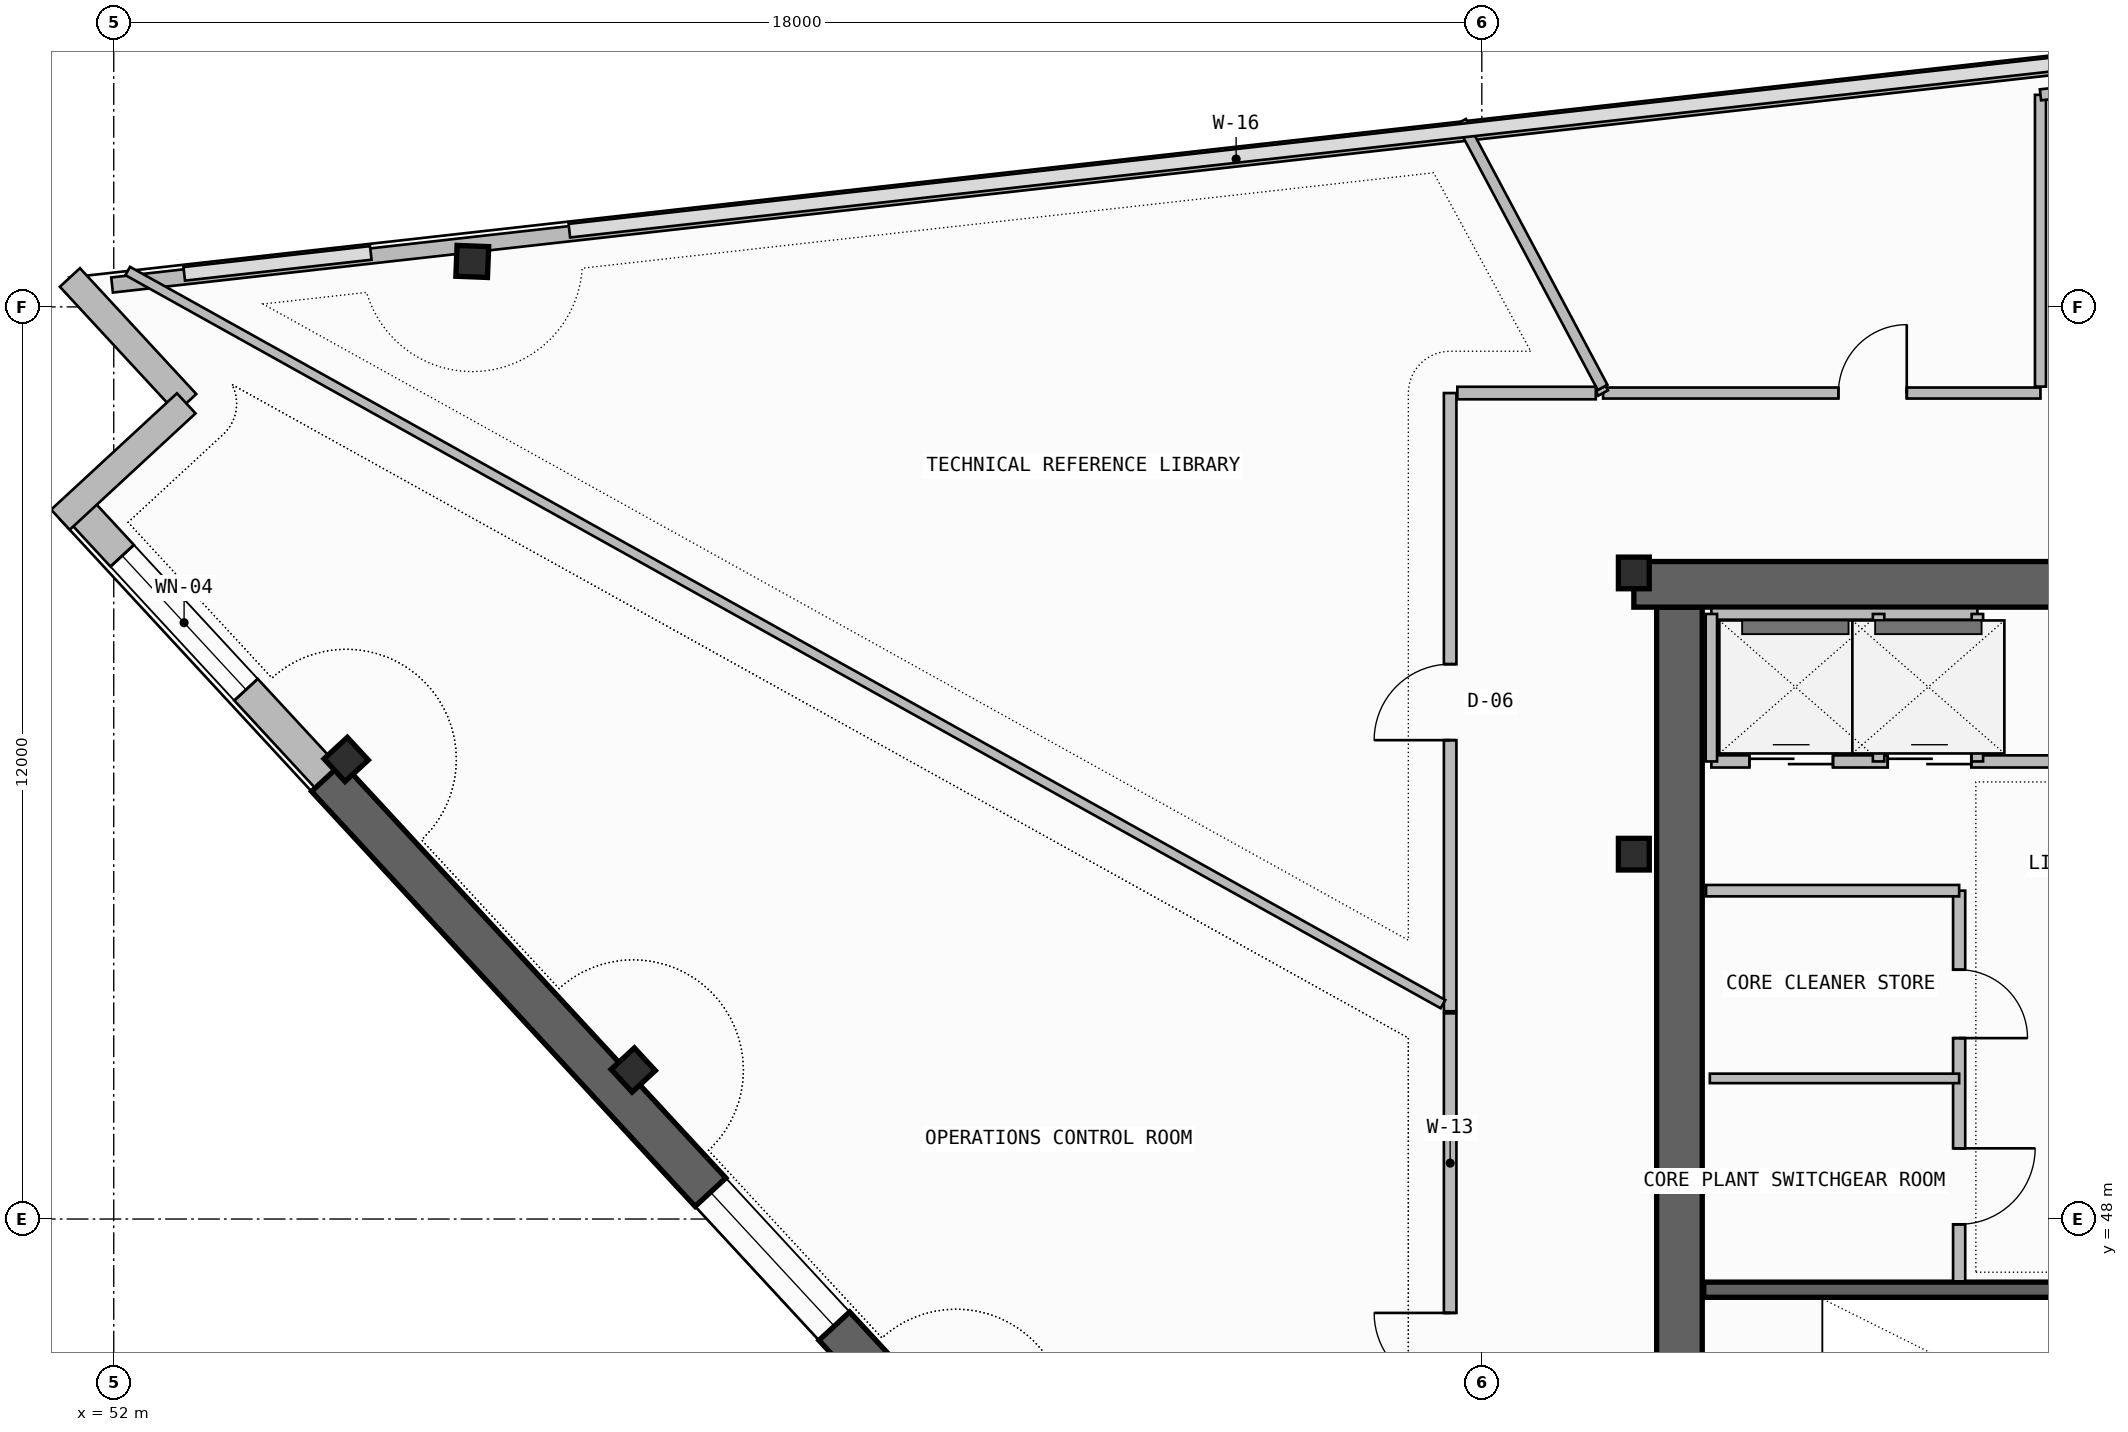
"""IFC4 building model, lengths in metres.
Left out: names, types, materials, properties, quantities, classifications, styles, units other than length and angle.
Written with IfcOpenShell. Run it as: python <this file> out.ifc"""

import sys

from ifc_helpers import new_model, si_unit, direction, frame, frame_2d, origin, origin_2d, place, context, subcontext, project, spatial, rectangle, i_section, extrude, element, fill, save


model = new_model("IFC4")
c1 = context("Model", 3, precision=1e-05, world=origin(), true_north=direction((0.0, 1.0)))
c2 = subcontext(c1, "Body", "Model", "MODEL_VIEW")
j1 = project(units=[si_unit("LENGTHUNIT", "METRE"), si_unit("PLANEANGLEUNIT", "RADIAN")], contexts=[c1])
p1 = place(None, origin())
s1 = spatial("IfcSite", under=j1, at=p1, CompositionType="ELEMENT")
p2 = place(p1, origin())
s2 = spatial("IfcBuilding", under=s1, at=p2, CompositionType="ELEMENT")
p3 = place(p2, frame((0.0, 0.0, 292.42)))
s3 = spatial("IfcBuildingStorey", under=s2, at=p3, CompositionType="ELEMENT", Elevation=292.42)
p4 = place(p3, frame((72.6, 43.35, -0.26), z_axis=(0.0, 0.0, 1.0), x_axis=(0.0, 1.0, 0.0)))
e1 = element("IfcWall", 1, at=p4, inside=s3, PredefinedType="SHEAR", context=c2, shape_type="SweptSolid", body=[
    extrude(rectangle(XDim=12.7, YDim=0.6, at=frame_2d((6.35, 0.0))), origin(), (0.0, 0.0, 1.0), 5.82),
])
p5 = place(p4, frame((1.35, 0.0, 0.26)))
e2 = element("IfcOpeningElement", 2, at=p5, cuts=e1, PredefinedType="OPENING", context=c2, shape_type="SweptSolid", body=[
    extrude(rectangle(XDim=1.2, YDim=2.2, at=frame_2d((0.6, 1.1))), frame((0.0, 0.31, 0.0), z_axis=(0.0, -1.0, 0.0), x_axis=(1.0, 0.0, 0.0)), (0.0, 0.0, 1.0), 0.62),
])
p6 = place(p3, frame((72.0, 56.35, -0.26), z_axis=(0.0, 0.0, 1.0), x_axis=(1.0, 0.0, 0.0)))
e3 = element("IfcWall", 3, at=p6, inside=s3, PredefinedType="SHEAR", context=c2, shape_type="SweptSolid", body=[
    extrude(rectangle(XDim=13.6, YDim=0.6, at=frame_2d((6.8, 0.0))), origin(), (0.0, 0.0, 1.0), 5.82),
])
for number, where, z_axis, x_axis in (
    (4, (72.0, 52.8, 0.0), (0.0, 0.0, 1.0), (1.0, 0.0, 0.0)),
    (5, (72.0, 56.5, 0.0), (0.0, 0.0, 1.0), (1.0, 0.0, 0.0)),
    (6, (56.717, 60.598, 0.0), (0.0, 0.0, 1.0), (0.039, 0.999, 0.0)),
    (7, (55.058, 54.046, 0.0), (0.0, 0.0, 1.0), (-0.679, 0.734, 0.0)),
    (8, (58.835, 49.961, 0.0), (0.0, 0.0, 1.0), (-0.679, 0.734, 0.0)),
):
    element("IfcColumn", number, at=place(p3, frame(where, z_axis=z_axis, x_axis=x_axis)), inside=s3, PredefinedType="COLUMN", context=c2, shape_type="SweptSolid", body=[
        extrude(i_section(OverallWidth=0.406, OverallDepth=0.416, WebThickness=0.03, FlangeThickness=0.048, FilletRadius=0.015, at=origin_2d()), origin(), (0.0, 0.0, 1.0), 5.76),
    ])
p7 = place(p3, frame((51.5, 57.387, 0.0), z_axis=(0.0, 0.0, 1.0), x_axis=(0.67880684669, -0.734316869537, 0.0)))
e9 = element("IfcWall", 9, at=p7, inside=s3, PredefinedType="SOLIDWALL", context=c2, shape_type="SweptSolid", body=[
    extrude(rectangle(XDim=4.869, YDim=0.42, at=frame_2d((2.434, 0.0))), origin(), (0.0, 0.0, 1.0), 4.945),
])
p8 = place(p7, frame((0.9, 0.0, 1.1)))
e10 = element("IfcOpeningElement", 10, at=p8, cuts=e9, PredefinedType="OPENING", context=c2, shape_type="SweptSolid", body=[
    extrude(rectangle(XDim=2.4, YDim=1.2, at=frame_2d((1.2, 0.6))), frame((0.0, 0.22, 0.0), z_axis=(0.0, -1.0, 0.0), x_axis=(1.0, 0.0, 0.0)), (0.0, 0.0, 1.0), 0.44),
])
p9 = place(p3, frame((54.805, 53.812, -0.26), z_axis=(0.0, 0.0, 1.0), x_axis=(0.678803115619, -0.734320318543, 0.0)))
e11 = element("IfcWall", 11, at=p9, inside=s3, PredefinedType="SHEAR", context=c2, shape_type="SweptSolid", body=[
    extrude(rectangle(XDim=18.083, YDim=0.55, at=frame_2d((9.042, 0.0))), origin(), (0.0, 0.0, 1.0), 5.82),
])
p10 = place(p9, frame((7.434, 0.0, 1.1)))
e12 = element("IfcOpeningElement", 12, at=p10, cuts=e11, PredefinedType="OPENING", context=c2, shape_type="SweptSolid", body=[
    extrude(rectangle(XDim=2.4, YDim=1.2, at=frame_2d((1.2, 0.6))), frame((0.0, 0.285, 0.0), z_axis=(0.0, -1.0, 0.0), x_axis=(1.0, 0.0, 0.0)), (0.0, 0.0, 1.0), 0.57),
])
for number, where, z_axis, x_axis in (
    (13, (51.423, 60.387, 0.0), (0.0, 0.0, 1.0), (0.679, -0.734, 0.0)),
    (14, (52.954, 58.731, 0.0), (0.0, 0.0, 1.0), (-0.734, -0.679, 0.0)),
):
    element("IfcWall", number, at=place(p3, frame(where, z_axis=z_axis, x_axis=x_axis)), inside=s3, PredefinedType="SOLIDWALL", context=c2, shape_type="SweptSolid", body=[
        extrude(rectangle(XDim=2.255, YDim=0.36, at=frame_2d((1.127, 0.0))), origin(), (0.0, 0.0, 1.0), 5.56),
    ])
p11 = place(p3, frame((81.557, 63.604, 0.0), z_axis=(0.0, 0.0, 1.0), x_axis=(-0.993775831398, -0.111398370403, 0.0)))
e15 = element("IfcWall", 15, at=p11, inside=s3, PredefinedType="PARAPET", context=c2, shape_type="SweptSolid", body=[
    extrude(rectangle(XDim=29.764, YDim=0.2, at=frame_2d((14.882, 0.0))), origin(), (0.0, 0.0, 1.0), 1.15),
])
p12 = place(p3, frame((72.92, 47.07, -0.26), z_axis=(0.0, 0.0, 1.0), x_axis=(1.0, 0.0, 0.0)))
e16 = element("IfcWall", 16, at=p12, inside=s3, PredefinedType="SOLIDWALL", context=c2, shape_type="SweptSolid", body=[
    extrude(rectangle(XDim=7.7, YDim=0.2, at=frame_2d((3.85, 0.0))), origin(), (0.0, 0.0, 1.0), 5.82),
])
p13 = place(p3, frame((76.28, 47.18, 0.0), z_axis=(0.0, 0.0, 1.0), x_axis=(0.0, 1.0, 0.0)))
e17 = element("IfcWall", 17, at=p13, inside=s3, PredefinedType="SOLIDWALL", context=c2, shape_type="SweptSolid", body=[
    extrude(rectangle(XDim=5.14, YDim=0.16, at=frame_2d((2.57, 0.0))), origin(), (0.0, 0.0, 1.0), 5.56),
])
p14 = place(p13, frame((0.75, 0.0, 0.0)))
e18 = element("IfcOpeningElement", 18, at=p14, cuts=e17, PredefinedType="OPENING", context=c2, shape_type="SweptSolid", body=[
    extrude(rectangle(XDim=1.0, YDim=2.2, at=frame_2d((0.5, 1.1))), frame((0.0, 0.09, 0.0), z_axis=(0.0, -1.0, 0.0), x_axis=(1.0, 0.0, 0.0)), (0.0, 0.0, 1.0), 0.18),
])
p15 = place(p13, frame((3.2, 0.0, 0.0)))
e19 = element("IfcOpeningElement", 19, at=p15, cuts=e17, PredefinedType="OPENING", context=c2, shape_type="SweptSolid", body=[
    extrude(rectangle(XDim=0.9, YDim=2.1, at=frame_2d((0.45, 1.05))), frame((0.0, 0.09, 0.0), z_axis=(0.0, -1.0, 0.0), x_axis=(1.0, 0.0, 0.0)), (0.0, 0.0, 1.0), 0.18),
])
p16 = place(p3, frame((72.95, 52.32, 0.0), z_axis=(0.0, 0.0, 1.0), x_axis=(1.0, 0.0, 0.0)))
e20 = element("IfcWall", 20, at=p16, inside=s3, PredefinedType="SOLIDWALL", context=c2, shape_type="SweptSolid", body=[
    extrude(rectangle(XDim=3.33, YDim=0.15, at=frame_2d((1.665, 0.0))), origin(), (0.0, 0.0, 1.0), 5.56),
])
p17 = place(p3, frame((73.0, 49.85, 0.0), z_axis=(0.0, 0.0, 1.0), x_axis=(1.0, 0.0, 0.0)))
e21 = element("IfcWall", 21, at=p17, inside=s3, PredefinedType="PARTITIONING", context=c2, shape_type="SweptSolid", body=[
    extrude(rectangle(XDim=3.28, YDim=0.125, at=frame_2d((1.64, 0.0))), origin(), (0.0, 0.0, 1.0), 5.56),
])
p18 = place(p3, frame((73.02, 54.02, 0.0), z_axis=(0.0, 0.0, 1.0), x_axis=(1.0, 0.0, 0.0)))
e22 = element("IfcWall", 22, at=p18, inside=s3, PredefinedType="SOLIDWALL", context=c2, shape_type="SweptSolid", body=[
    extrude(rectangle(XDim=12.08, YDim=0.16, at=frame_2d((6.04, 0.0))), origin(), (0.0, 0.0, 1.0), 5.56),
])
p19 = place(p18, frame((0.5, 0.0, 0.0)))
e23 = element("IfcOpeningElement", 23, at=p19, cuts=e22, PredefinedType="OPENING", context=c2, shape_type="SweptSolid", body=[
    extrude(rectangle(XDim=1.1, YDim=2.25, at=frame_2d((0.55, 1.125))), frame((0.0, 0.09, 0.0), z_axis=(0.0, -1.0, 0.0), x_axis=(1.0, 0.0, 0.0)), (0.0, 0.0, 1.0), 0.18),
])
p20 = place(p18, frame((2.32, 0.0, 0.0)))
e24 = element("IfcOpeningElement", 24, at=p20, cuts=e22, PredefinedType="OPENING", context=c2, shape_type="SweptSolid", body=[
    extrude(rectangle(XDim=1.1, YDim=2.25, at=frame_2d((0.55, 1.125))), frame((0.0, 0.09, 0.0), z_axis=(0.0, -1.0, 0.0), x_axis=(1.0, 0.0, 0.0)), (0.0, 0.0, 1.0), 0.18),
])
p21 = place(p18, frame((5.8, 0.0, 0.0)))
e25 = element("IfcOpeningElement", 25, at=p21, cuts=e22, PredefinedType="OPENING", context=c2, shape_type="SweptSolid", body=[
    extrude(rectangle(XDim=0.9, YDim=2.1, at=frame_2d((0.45, 1.05))), frame((0.0, 0.09, 0.0), z_axis=(0.0, -1.0, 0.0), x_axis=(1.0, 0.0, 0.0)), (0.0, 0.0, 1.0), 0.18),
])
p22 = place(p3, frame((73.02, 55.96, 0.0), z_axis=(0.0, 0.0, 1.0), x_axis=(1.0, 0.0, 0.0)))
e26 = element("IfcWall", 26, at=p22, inside=s3, PredefinedType="SOLIDWALL", context=c2, shape_type="SweptSolid", body=[
    extrude(rectangle(XDim=3.5, YDim=0.15, at=frame_2d((1.75, 0.0))), origin(), (0.0, 0.0, 1.0), 5.56),
])
p23 = place(p3, frame((73.02, 54.02, 0.0), z_axis=(0.0, 0.0, 1.0), x_axis=(0.0, 1.0, 0.0)))
e27 = element("IfcWall", 27, at=p23, inside=s3, PredefinedType="PLUMBINGWALL", context=c2, shape_type="SweptSolid", body=[
    extrude(rectangle(XDim=1.94, YDim=0.15, at=frame_2d((0.97, 0.0))), origin(), (0.0, 0.0, 1.0), 5.56),
])
p24 = place(p3, frame((76.52, 54.02, 0.0), z_axis=(0.0, 0.0, 1.0), x_axis=(0.0, 1.0, 0.0)))
e28 = element("IfcWall", 28, at=p24, inside=s3, PredefinedType="SOLIDWALL", context=c2, shape_type="SweptSolid", body=[
    extrude(rectangle(XDim=1.94, YDim=0.15, at=frame_2d((0.97, 0.0))), origin(), (0.0, 0.0, 1.0), 5.56),
])
p25 = place(p3, frame((75.22, 54.02, 0.0), z_axis=(0.0, 0.0, 1.0), x_axis=(0.0, 1.0, 0.0)))
e29 = element("IfcWall", 29, at=p25, inside=s3, PredefinedType="PLUMBINGWALL", context=c2, shape_type="SweptSolid", body=[
    extrude(rectangle(XDim=1.94, YDim=0.15, at=frame_2d((0.97, 0.0))), origin(), (0.0, 0.0, 1.0), 5.56),
])
p26 = place(p3, frame((77.35, 58.867, 0.0), z_axis=(0.0, 0.0, 1.0), x_axis=(-1.0, 0.0, 0.0)))
e30 = element("IfcWall", 30, at=p26, inside=s3, PredefinedType="PARTITIONING", context=c2, shape_type="SweptSolid", body=[
    extrude(rectangle(XDim=5.755, YDim=0.145, at=frame_2d((2.877, 0.0))), origin(), (0.0, 0.0, 1.0), 5.56),
])
p27 = place(p26, frame((1.759, 0.0, 0.0)))
e31 = element("IfcOpeningElement", 31, at=p27, cuts=e30, PredefinedType="OPENING", context=c2, shape_type="SweptSolid", body=[
    extrude(rectangle(XDim=0.9, YDim=2.1, at=frame_2d((0.45, 1.05))), frame((0.0, 0.083, 0.0), z_axis=(0.0, -1.0, 0.0), x_axis=(1.0, 0.0, 0.0)), (0.0, 0.0, 1.0), 0.165),
])
p28 = place(p3, frame((77.35, 62.79, 0.0), z_axis=(0.0, 0.0, 1.0), x_axis=(0.0, -1.0, 0.0)))
e32 = element("IfcWall", 32, at=p28, inside=s3, PredefinedType="PARTITIONING", context=c2, shape_type="SweptSolid", body=[
    extrude(rectangle(XDim=3.839, YDim=0.145, at=frame_2d((1.919, 0.0))), origin(), (0.0, 0.0, 1.0), 5.56),
])
p29 = place(p3, frame((79.565, 63.038, 0.0), z_axis=(0.0, 0.0, 1.0), x_axis=(-0.993777768559, -0.111381087792, 0.0)))
e33 = element("IfcWall", 33, at=p29, inside=s3, PredefinedType="PARTITIONING", context=c2, shape_type="SweptSolid", body=[
    extrude(rectangle(XDim=2.229, YDim=0.145, at=frame_2d((1.115, 0.0))), origin(), (0.0, 0.0, 1.0), 5.56),
])
p30 = place(p3, frame((71.595, 58.867, 0.0), z_axis=(0.0, 0.0, 1.0), x_axis=(-0.478351827629, 0.878168280573, 0.0)))
e34 = element("IfcWall", 34, at=p30, inside=s3, PredefinedType="PARTITIONING", context=c2, shape_type="SweptSolid", body=[
    extrude(rectangle(XDim=0.068, YDim=0.145, at=frame_2d((0.034, 0.0))), origin(), (0.0, 0.0, 1.0), 5.56),
])
p31 = place(p3, frame((71.589, 58.941, 0.0), z_axis=(0.0, 0.0, 1.0), x_axis=(-0.469769313207, 0.882789211742, 0.0)))
e35 = element("IfcWall", 35, at=p31, inside=s3, PredefinedType="PARTITIONING", context=c2, shape_type="SweptSolid", body=[
    extrude(rectangle(XDim=3.962, YDim=0.145, at=frame_2d((1.981, 0.0))), origin(), (0.0, 0.0, 1.0), 5.56),
])
p32 = place(p3, frame((69.583, 58.867, 0.0), z_axis=(0.0, 0.0, 1.0), x_axis=(0.0, -1.0, 0.0)))
e36 = element("IfcWall", 36, at=p32, inside=s3, PredefinedType="PARTITIONING", context=c2, shape_type="SweptSolid", body=[
    extrude(rectangle(XDim=8.134, YDim=0.165, at=frame_2d((4.067, 0.0))), origin(), (0.0, 0.0, 1.0), 5.045),
])
p33 = place(p32, frame((3.567, 0.0, 0.0)))
e37 = element("IfcOpeningElement", 37, at=p33, cuts=e36, PredefinedType="OPENING", context=c2, shape_type="SweptSolid", body=[
    extrude(rectangle(XDim=1.0, YDim=2.2, at=frame_2d((0.5, 1.1))), frame((0.0, 0.093, 0.0), z_axis=(0.0, -1.0, 0.0), x_axis=(1.0, 0.0, 0.0)), (0.0, 0.0, 1.0), 0.185),
])
p34 = place(p3, frame((71.499, 58.867, 0.0), z_axis=(0.0, 0.0, 1.0), x_axis=(-1.0, 0.0, 0.0)))
e38 = element("IfcWall", 38, at=p34, inside=s3, PredefinedType="PARTITIONING", context=c2, shape_type="SweptSolid", body=[
    extrude(rectangle(XDim=1.822, YDim=0.165, at=frame_2d((0.911, 0.0))), origin(), (0.0, 0.0, 1.0), 5.56),
])
p35 = place(p3, frame((69.489, 50.827, 0.0), z_axis=(0.0, 0.0, 1.0), x_axis=(-0.873486229604, 0.486848854053, 0.0)))
e39 = element("IfcWall", 39, at=p35, inside=s3, PredefinedType="PARTITIONING", context=c2, shape_type="SweptSolid", body=[
    extrude(rectangle(XDim=19.812, YDim=0.125, at=frame_2d((9.906, 0.0))), origin(), (0.0, 0.0, 1.0), 4.945),
])
p36 = place(p3, frame((69.583, 50.706, 0.0), z_axis=(0.0, 0.0, 1.0), x_axis=(0.0, -1.0, 0.0)))
e40 = element("IfcWall", 40, at=p36, inside=s3, PredefinedType="PARTITIONING", context=c2, shape_type="SweptSolid", body=[
    extrude(rectangle(XDim=8.882, YDim=0.165, at=frame_2d((4.441, 0.0))), origin(), (0.0, 0.0, 1.0), 5.045),
])
p37 = place(p36, frame((3.941, 0.0, 0.0)))
e41 = element("IfcOpeningElement", 41, at=p37, cuts=e40, PredefinedType="OPENING", context=c2, shape_type="SweptSolid", body=[
    extrude(rectangle(XDim=1.0, YDim=2.2, at=frame_2d((0.5, 1.1))), frame((0.0, 0.093, 0.0), z_axis=(0.0, -1.0, 0.0), x_axis=(1.0, 0.0, 0.0)), (0.0, 0.0, 1.0), 0.185),
])
p38 = place(p8, origin())
e42 = element("IfcWindow", 42, at=p38, inside=s3, PartitioningType="SINGLE_PANEL", PredefinedType="WINDOW", context=c2, shape_type="SweptSolid", body=[
    extrude(rectangle(XDim=2.4, YDim=1.2, at=frame_2d((1.2, 0.6))), frame((0.0, 0.03, 0.0), z_axis=(0.0, -1.0, 0.0), x_axis=(1.0, 0.0, 0.0)), (0.0, 0.0, 1.0), 0.06),
])
fill(e10, e42)
p39 = place(p10, origin())
e43 = element("IfcWindow", 43, at=p39, inside=s3, PartitioningType="SINGLE_PANEL", PredefinedType="WINDOW", context=c2, shape_type="SweptSolid", body=[
    extrude(rectangle(XDim=2.4, YDim=1.2, at=frame_2d((1.2, 0.6))), frame((0.0, 0.03, 0.0), z_axis=(0.0, -1.0, 0.0), x_axis=(1.0, 0.0, 0.0)), (0.0, 0.0, 1.0), 0.06),
])
fill(e12, e43)
p40 = place(p14, frame((1.0, 0.0, 0.0), z_axis=(0.0, 0.0, 1.0), x_axis=(-1.0, 0.0, 0.0)))
e44 = element("IfcDoor", 44, at=p40, inside=s3, OperationType="SINGLE_SWING_LEFT", PredefinedType="DOOR", context=c2, shape_type="SweptSolid", body=[
    extrude(rectangle(XDim=1.0, YDim=2.2, at=frame_2d((0.5, 1.1))), frame((0.0, 0.025, 0.0), z_axis=(0.0, -1.0, 0.0), x_axis=(1.0, 0.0, 0.0)), (0.0, 0.0, 1.0), 0.05),
])
fill(e18, e44)
p41 = place(p15, frame((0.9, 0.0, 0.0), z_axis=(0.0, 0.0, 1.0), x_axis=(-1.0, 0.0, 0.0)))
e45 = element("IfcDoor", 45, at=p41, inside=s3, OperationType="SINGLE_SWING_RIGHT", PredefinedType="DOOR", context=c2, shape_type="SweptSolid", body=[
    extrude(rectangle(XDim=0.9, YDim=2.1, at=frame_2d((0.45, 1.05))), frame((0.0, 0.025, 0.0), z_axis=(0.0, -1.0, 0.0), x_axis=(1.0, 0.0, 0.0)), (0.0, 0.0, 1.0), 0.05),
])
fill(e19, e45)
p42 = place(p19, origin())
e46 = element("IfcDoor", 46, at=p42, inside=s3, OperationType="DOUBLE_DOOR_SLIDING", PredefinedType="DOOR", context=c2, shape_type="SweptSolid", body=[
    extrude(rectangle(XDim=1.1, YDim=2.25, at=frame_2d((0.55, 1.125))), frame((0.0, 0.025, 0.0), z_axis=(0.0, -1.0, 0.0), x_axis=(1.0, 0.0, 0.0)), (0.0, 0.0, 1.0), 0.05),
])
fill(e23, e46)
p43 = place(p20, origin())
e47 = element("IfcDoor", 47, at=p43, inside=s3, OperationType="DOUBLE_DOOR_SLIDING", PredefinedType="DOOR", context=c2, shape_type="SweptSolid", body=[
    extrude(rectangle(XDim=1.1, YDim=2.25, at=frame_2d((0.55, 1.125))), frame((0.0, 0.025, 0.0), z_axis=(0.0, -1.0, 0.0), x_axis=(1.0, 0.0, 0.0)), (0.0, 0.0, 1.0), 0.05),
])
fill(e24, e47)
p44 = place(p27, frame((0.9, 0.0, 0.0), z_axis=(0.0, 0.0, 1.0), x_axis=(-1.0, 0.0, 0.0)))
e48 = element("IfcDoor", 48, at=p44, inside=s3, OperationType="SINGLE_SWING_RIGHT", PredefinedType="DOOR", context=c2, shape_type="SweptSolid", body=[
    extrude(rectangle(XDim=0.9, YDim=2.1, at=frame_2d((0.45, 1.05))), frame((0.0, 0.025, 0.0), z_axis=(0.0, -1.0, 0.0), x_axis=(1.0, 0.0, 0.0)), (0.0, 0.0, 1.0), 0.05),
])
fill(e31, e48)
p45 = place(p33, frame((1.0, 0.0, 0.0), z_axis=(0.0, 0.0, 1.0), x_axis=(-1.0, 0.0, 0.0)))
e49 = element("IfcDoor", 49, at=p45, inside=s3, OperationType="SINGLE_SWING_LEFT", PredefinedType="DOOR", context=c2, shape_type="SweptSolid", body=[
    extrude(rectangle(XDim=1.0, YDim=2.2, at=frame_2d((0.5, 1.1))), frame((0.0, 0.025, 0.0), z_axis=(0.0, -1.0, 0.0), x_axis=(1.0, 0.0, 0.0)), (0.0, 0.0, 1.0), 0.05),
])
fill(e37, e49)
p46 = place(p37, frame((1.0, 0.0, 0.0), z_axis=(0.0, 0.0, 1.0), x_axis=(-1.0, 0.0, 0.0)))
e50 = element("IfcDoor", 50, at=p46, inside=s3, OperationType="SINGLE_SWING_RIGHT", PredefinedType="DOOR", context=c2, shape_type="SweptSolid", body=[
    extrude(rectangle(XDim=1.0, YDim=2.2, at=frame_2d((0.5, 1.1))), frame((0.0, 0.025, 0.0), z_axis=(0.0, -1.0, 0.0), x_axis=(1.0, 0.0, 0.0)), (0.0, 0.0, 1.0), 0.05),
])
fill(e41, e50)
save(model, sys.argv[1])
